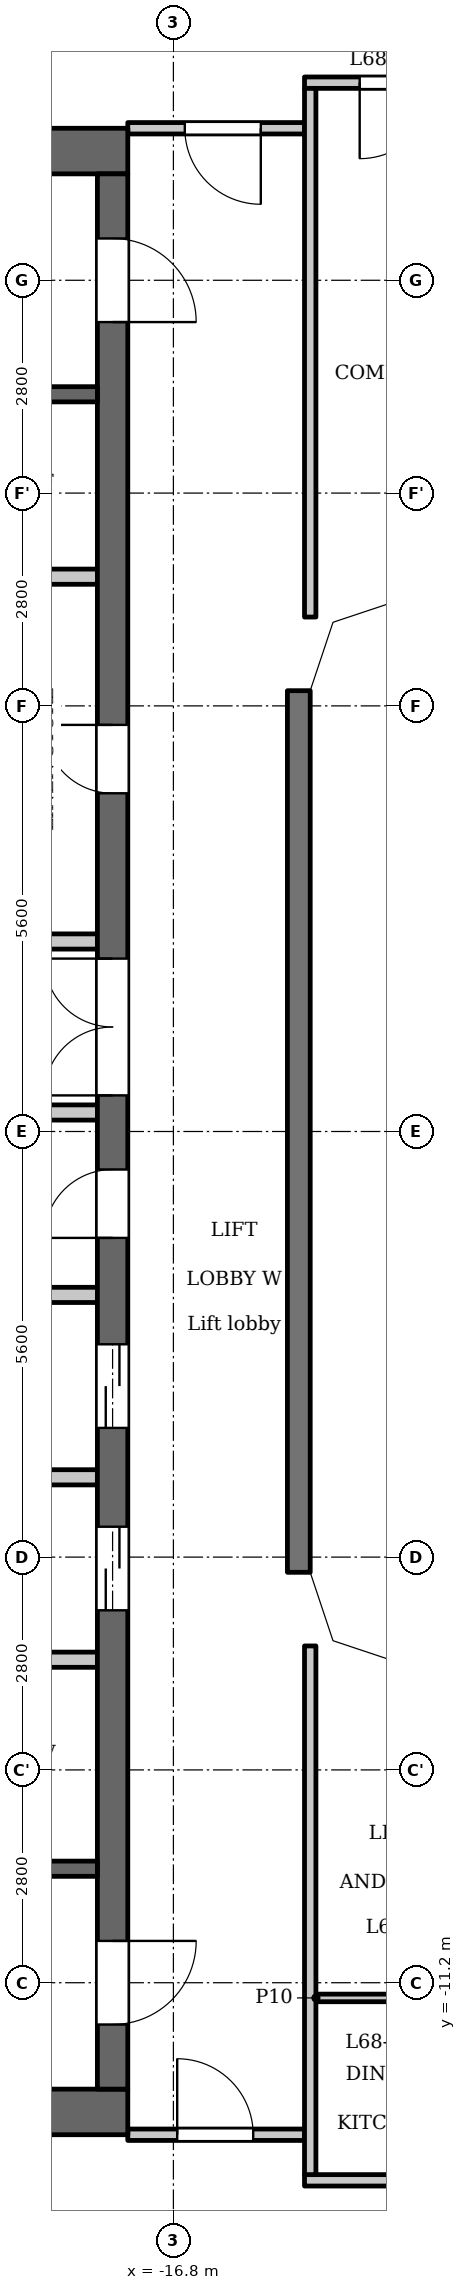
"""IFC4 building model, lengths in metres.
Left out: names, types, materials, properties, quantities, classifications, styles, units other than length and angle.
Written with IfcOpenShell. Run it as: python <this file> out.ifc"""

import sys

from ifc_helpers import new_model, si_unit, direction, frame, frame_2d, origin, place, context, subcontext, project, spatial, polyline, rectangle, outline, extrude, element, fill, save


model = new_model("IFC4")
c1 = context("Model", 3, precision=1e-05, world=origin(), true_north=direction((0.0, 1.0)))
c2 = subcontext(c1, "Body", "Model", "MODEL_VIEW")
j1 = project(units=[si_unit("LENGTHUNIT", "METRE"), si_unit("PLANEANGLEUNIT", "RADIAN")], contexts=[c1])
p1 = place(None, origin())
s1 = spatial("IfcSite", under=j1, at=p1, CompositionType="ELEMENT")
p2 = place(p1, origin())
s2 = spatial("IfcBuilding", under=s1, at=p2, CompositionType="ELEMENT")
p3 = place(p2, frame((0.0, 0.0, 262.7)))
s3 = spatial("IfcBuildingStorey", under=s2, at=p3, CompositionType="ELEMENT", Elevation=262.7)
p4 = place(p3, frame((-15.15, -5.8, 0.0), z_axis=(0.0, 0.0, 1.0), x_axis=(0.0, 1.0, 0.0)))
e1 = element("IfcWall", 1, at=p4, inside=s3, PredefinedType="SOLIDWALL", context=c2, shape_type="SweptSolid", body=[
    extrude(rectangle(XDim=11.6, YDim=0.3, at=frame_2d((5.8, 0.0))), origin(), (0.0, 0.0, 1.0), 3.2),
])
for number, where, z_axis, x_axis in (
    (2, (-17.4, 12.9, 0.0), (0.0, 0.0, 1.0), (-1.0, 0.0, 0.0)),
    (3, (-17.4, -12.9, 0.0), (0.0, 0.0, 1.0), (-1.0, 0.0, 0.0)),
):
    element("IfcWall", number, at=place(p3, frame(where, z_axis=z_axis, x_axis=x_axis)), inside=s3, PredefinedType="SHEAR", context=c2, shape_type="SweptSolid", body=[
        extrude(rectangle(XDim=7.32, YDim=0.6, at=frame_2d((3.66, 0.0))), origin(), (0.0, 0.0, 1.0), 3.2),
    ])
p5 = place(p3, frame((-17.6, -12.6, 0.0), z_axis=(0.0, 0.0, 1.0), x_axis=(0.0, 1.0, 0.0)))
e4 = element("IfcWall", 4, at=p5, inside=s3, PredefinedType="SHEAR", context=c2, shape_type="SweptSolid", body=[
    extrude(rectangle(XDim=25.2, YDim=0.4, at=frame_2d((12.6, 0.0))), origin(), (0.0, 0.0, 1.0), 3.2),
])
p6 = place(p5, frame((6.3, 0.0, 0.0)))
e5 = element("IfcOpeningElement", 5, at=p6, cuts=e4, PredefinedType="OPENING", context=c2, shape_type="SweptSolid", body=[
    extrude(rectangle(XDim=1.1, YDim=2.1, at=frame_2d((0.55, 1.05))), frame((0.0, 0.21, 0.0), z_axis=(0.0, -1.0, 0.0), x_axis=(1.0, 0.0, 0.0)), (0.0, 0.0, 1.0), 0.42),
])
p7 = place(p5, frame((8.7, 0.0, 0.0)))
e6 = element("IfcOpeningElement", 6, at=p7, cuts=e4, PredefinedType="OPENING", context=c2, shape_type="SweptSolid", body=[
    extrude(rectangle(XDim=1.1, YDim=2.1, at=frame_2d((0.55, 1.05))), frame((0.0, 0.21, 0.0), z_axis=(0.0, -1.0, 0.0), x_axis=(1.0, 0.0, 0.0)), (0.0, 0.0, 1.0), 0.42),
])
p8 = place(p5, frame((11.2, 0.0, 0.0)))
e7 = element("IfcOpeningElement", 7, at=p8, cuts=e4, PredefinedType="OPENING", context=c2, shape_type="SweptSolid", body=[
    extrude(rectangle(XDim=0.9, YDim=2.1, at=frame_2d((0.45, 1.05))), frame((0.0, 0.21, 0.0), z_axis=(0.0, -1.0, 0.0), x_axis=(1.0, 0.0, 0.0)), (0.0, 0.0, 1.0), 0.42),
])
p9 = place(p5, frame((17.05, 0.0, 0.0)))
e8 = element("IfcOpeningElement", 8, at=p9, cuts=e4, PredefinedType="OPENING", context=c2, shape_type="SweptSolid", body=[
    extrude(rectangle(XDim=0.9, YDim=2.1, at=frame_2d((0.45, 1.05))), frame((0.0, 0.21, 0.0), z_axis=(0.0, -1.0, 0.0), x_axis=(1.0, 0.0, 0.0)), (0.0, 0.0, 1.0), 0.42),
])
p10 = place(p5, frame((23.25, 0.0, 0.0)))
e9 = element("IfcOpeningElement", 9, at=p10, cuts=e4, PredefinedType="OPENING", context=c2, shape_type="SweptSolid", body=[
    extrude(rectangle(XDim=1.1, YDim=2.1, at=frame_2d((0.55, 1.05))), frame((0.0, 0.21, 0.0), z_axis=(0.0, -1.0, 0.0), x_axis=(1.0, 0.0, 0.0)), (0.0, 0.0, 1.0), 0.42),
])
p11 = place(p5, frame((0.85, 0.0, 0.0)))
e10 = element("IfcOpeningElement", 10, at=p11, cuts=e4, PredefinedType="OPENING", context=c2, shape_type="SweptSolid", body=[
    extrude(rectangle(XDim=1.1, YDim=2.1, at=frame_2d((0.55, 1.05))), frame((0.0, 0.21, 0.0), z_axis=(0.0, -1.0, 0.0), x_axis=(1.0, 0.0, 0.0)), (0.0, 0.0, 1.0), 0.42),
])
p12 = place(p5, frame((13.075, 0.0, 0.0)))
e11 = element("IfcOpeningElement", 11, at=p12, cuts=e4, PredefinedType="OPENING", context=c2, shape_type="SweptSolid", body=[
    extrude(rectangle(XDim=1.8, YDim=2.1, at=frame_2d((0.9, 1.05))), frame((0.0, 0.21, 0.0), z_axis=(0.0, -1.0, 0.0), x_axis=(1.0, 0.0, 0.0)), (0.0, 0.0, 1.0), 0.42),
])
p13 = place(p3, frame((-17.8, -9.7, 0.0), z_axis=(0.0, 0.0, 1.0), x_axis=(-1.0, 0.0, 0.0)))
e12 = element("IfcWall", 12, at=p13, inside=s3, PredefinedType="SHEAR", context=c2, shape_type="SweptSolid", body=[
    extrude(rectangle(XDim=5.8, YDim=0.2, at=frame_2d((2.9, 0.0))), origin(), (0.0, 0.0, 1.0), 3.2),
])
p14 = place(p13, frame((0.85, 0.0, 0.0)))
e13 = element("IfcOpeningElement", 13, at=p14, cuts=e12, PredefinedType="OPENING", context=c2, shape_type="SweptSolid", body=[
    extrude(rectangle(XDim=1.1, YDim=2.1, at=frame_2d((0.55, 1.05))), frame((0.0, 0.11, 0.0), z_axis=(0.0, -1.0, 0.0), x_axis=(1.0, 0.0, 0.0)), (0.0, 0.0, 1.0), 0.22),
])
p15 = place(p13, frame((3.75, 0.0, 0.0)))
e14 = element("IfcOpeningElement", 14, at=p15, cuts=e12, PredefinedType="OPENING", context=c2, shape_type="SweptSolid", body=[
    extrude(rectangle(XDim=1.1, YDim=2.1, at=frame_2d((0.55, 1.05))), frame((0.0, 0.11, 0.0), z_axis=(0.0, -1.0, 0.0), x_axis=(1.0, 0.0, 0.0)), (0.0, 0.0, 1.0), 0.22),
])
for number, where, z_axis, x_axis in (
    (15, (-17.8, -6.95, 0.0), (0.0, 0.0, 1.0), (-1.0, 0.0, 0.0)),
    (16, (-17.8, -4.55, 0.0), (0.0, 0.0, 1.0), (-1.0, 0.0, 0.0)),
    (17, (-17.8, -2.15, 0.0), (0.0, 0.0, 1.0), (-1.0, 0.0, 0.0)),
):
    element("IfcWall", number, at=place(p3, frame(where, z_axis=z_axis, x_axis=x_axis)), inside=s3, PredefinedType="PARTITIONING", context=c2, shape_type="SweptSolid", body=[
        extrude(rectangle(XDim=2.8, YDim=0.2, at=frame_2d((1.4, 0.0))), origin(), (0.0, 0.0, 1.0), 3.2),
    ])
p16 = place(p3, frame((-17.8, 0.25, 0.0), z_axis=(0.0, 0.0, 1.0), x_axis=(-1.0, 0.0, 0.0)))
e18 = element("IfcWall", 18, at=p16, inside=s3, PredefinedType="PARTITIONING", context=c2, shape_type="SweptSolid", body=[
    extrude(rectangle(XDim=3.0, YDim=0.2, at=frame_2d((1.5, 0.0))), origin(), (0.0, 0.0, 1.0), 3.2),
])
p17 = place(p3, frame((-17.8, 2.5, 0.0), z_axis=(0.0, 0.0, 1.0), x_axis=(-1.0, 0.0, 0.0)))
e19 = element("IfcWall", 19, at=p17, inside=s3, PredefinedType="PARTITIONING", context=c2, shape_type="SweptSolid", body=[
    extrude(rectangle(XDim=3.0, YDim=0.2, at=frame_2d((1.5, 0.0))), origin(), (0.0, 0.0, 1.0), 3.2),
])
p18 = place(p17, frame((1.7, 0.0, 0.0)))
e20 = element("IfcOpeningElement", 20, at=p18, cuts=e19, PredefinedType="OPENING", context=c2, shape_type="SweptSolid", body=[
    extrude(rectangle(XDim=0.9, YDim=2.1, at=frame_2d((0.45, 1.05))), frame((0.0, 0.11, 0.0), z_axis=(0.0, -1.0, 0.0), x_axis=(1.0, 0.0, 0.0)), (0.0, 0.0, 1.0), 0.22),
])
p19 = place(p3, frame((-17.8, 7.3, 0.0), z_axis=(0.0, 0.0, 1.0), x_axis=(-1.0, 0.0, 0.0)))
e21 = element("IfcWall", 21, at=p19, inside=s3, PredefinedType="PARTITIONING", context=c2, shape_type="SweptSolid", body=[
    extrude(rectangle(XDim=2.8, YDim=0.2, at=frame_2d((1.4, 0.0))), origin(), (0.0, 0.0, 1.0), 3.2),
])
p20 = place(p3, frame((-17.8, 9.7, 0.0), z_axis=(0.0, 0.0, 1.0), x_axis=(-1.0, 0.0, 0.0)))
e22 = element("IfcWall", 22, at=p20, inside=s3, PredefinedType="SHEAR", context=c2, shape_type="SweptSolid", body=[
    extrude(rectangle(XDim=5.8, YDim=0.2, at=frame_2d((2.9, 0.0))), origin(), (0.0, 0.0, 1.0), 3.2),
])
p21 = place(p20, frame((0.85, 0.0, 0.0)))
e23 = element("IfcOpeningElement", 23, at=p21, cuts=e22, PredefinedType="OPENING", context=c2, shape_type="SweptSolid", body=[
    extrude(rectangle(XDim=1.1, YDim=2.1, at=frame_2d((0.55, 1.05))), frame((0.0, 0.11, 0.0), z_axis=(0.0, -1.0, 0.0), x_axis=(1.0, 0.0, 0.0)), (0.0, 0.0, 1.0), 0.22),
])
p22 = place(p20, frame((3.75, 0.0, 0.0)))
e24 = element("IfcOpeningElement", 24, at=p22, cuts=e22, PredefinedType="OPENING", context=c2, shape_type="SweptSolid", body=[
    extrude(rectangle(XDim=1.1, YDim=2.1, at=frame_2d((0.55, 1.05))), frame((0.0, 0.11, 0.0), z_axis=(0.0, -1.0, 0.0), x_axis=(1.0, 0.0, 0.0)), (0.0, 0.0, 1.0), 0.22),
])
p23 = place(p3, frame((-15.075, -13.8, 0.0), z_axis=(0.0, 0.0, 1.0), x_axis=(1.0, 0.0, 0.0)))
e25 = element("IfcWall", 25, at=p23, inside=s3, PredefinedType="PARTITIONING", context=c2, shape_type="SweptSolid", body=[
    extrude(rectangle(XDim=30.15, YDim=0.15, at=frame_2d((15.075, 0.0))), origin(), (0.0, 0.0, 1.0), 3.2),
])
p24 = place(p23, frame((2.225, 0.0, 0.0)))
e26 = element("IfcOpeningElement", 26, at=p24, cuts=e25, PredefinedType="OPENING", context=c2, shape_type="SweptSolid", body=[
    extrude(rectangle(XDim=1.0, YDim=2.1, at=frame_2d((0.5, 1.05))), frame((0.0, 0.085, 0.0), z_axis=(0.0, -1.0, 0.0), x_axis=(1.0, 0.0, 0.0)), (0.0, 0.0, 1.0), 0.17),
])
p25 = place(p23, frame((10.825, 0.0, 0.0)))
e27 = element("IfcOpeningElement", 27, at=p25, cuts=e25, PredefinedType="OPENING", context=c2, shape_type="SweptSolid", body=[
    extrude(rectangle(XDim=1.0, YDim=2.1, at=frame_2d((0.5, 1.05))), frame((0.0, 0.085, 0.0), z_axis=(0.0, -1.0, 0.0), x_axis=(1.0, 0.0, 0.0)), (0.0, 0.0, 1.0), 0.17),
])
p26 = place(p23, frame((15.775, 0.0, 0.0)))
e28 = element("IfcOpeningElement", 28, at=p26, cuts=e25, PredefinedType="OPENING", context=c2, shape_type="SweptSolid", body=[
    extrude(rectangle(XDim=1.0, YDim=2.1, at=frame_2d((0.5, 1.05))), frame((0.0, 0.085, 0.0), z_axis=(0.0, -1.0, 0.0), x_axis=(1.0, 0.0, 0.0)), (0.0, 0.0, 1.0), 0.17),
])
p27 = place(p3, frame((-17.4, -13.2, 0.0), z_axis=(0.0, 0.0, 1.0), x_axis=(1.0, 0.0, 0.0)))
e29 = element("IfcWall", 29, at=p27, inside=s3, PredefinedType="PARTITIONING", context=c2, shape_type="SweptSolid", body=[
    extrude(rectangle(XDim=2.325, YDim=0.15, at=frame_2d((1.163, 0.0))), origin(), (0.0, 0.0, 1.0), 3.2),
])
p28 = place(p27, frame((0.65, 0.0, 0.0)))
e30 = element("IfcOpeningElement", 30, at=p28, cuts=e29, PredefinedType="OPENING", context=c2, shape_type="SweptSolid", body=[
    extrude(rectangle(XDim=1.0, YDim=2.1, at=frame_2d((0.5, 1.05))), frame((0.0, 0.085, 0.0), z_axis=(0.0, -1.0, 0.0), x_axis=(1.0, 0.0, 0.0)), (0.0, 0.0, 1.0), 0.17),
])
p29 = place(p3, frame((-14.925, -11.4, 0.0), z_axis=(0.0, 0.0, 1.0), x_axis=(1.0, 0.0, 0.0)))
e31 = element("IfcWall", 31, at=p29, inside=s3, PredefinedType="PARTITIONING", context=c2, shape_type="SweptSolid", body=[
    extrude(rectangle(XDim=29.85, YDim=0.1, at=frame_2d((14.925, 0.0))), origin(), (0.0, 0.0, 1.0), 3.2),
])
p30 = place(p29, frame((7.875, 0.0, 0.0)))
e32 = element("IfcOpeningElement", 32, at=p30, cuts=e31, PredefinedType="OPENING", context=c2, shape_type="SweptSolid", body=[
    extrude(rectangle(XDim=0.8, YDim=2.1, at=frame_2d((0.4, 1.05))), frame((0.0, 0.06, 0.0), z_axis=(0.0, -1.0, 0.0), x_axis=(1.0, 0.0, 0.0)), (0.0, 0.0, 1.0), 0.12),
])
p31 = place(p29, frame((1.175, 0.0, 0.0)))
e33 = element("IfcOpeningElement", 33, at=p31, cuts=e31, PredefinedType="OPENING", context=c2, shape_type="SweptSolid", body=[
    extrude(rectangle(XDim=0.9, YDim=2.1, at=frame_2d((0.45, 1.05))), frame((0.0, 0.06, 0.0), z_axis=(0.0, -1.0, 0.0), x_axis=(1.0, 0.0, 0.0)), (0.0, 0.0, 1.0), 0.12),
])
p32 = place(p29, frame((13.475, 0.0, 0.0)))
e34 = element("IfcOpeningElement", 34, at=p32, cuts=e31, PredefinedType="OPENING", context=c2, shape_type="SweptSolid", body=[
    extrude(rectangle(XDim=0.8, YDim=2.1, at=frame_2d((0.4, 1.05))), frame((0.0, 0.06, 0.0), z_axis=(0.0, -1.0, 0.0), x_axis=(1.0, 0.0, 0.0)), (0.0, 0.0, 1.0), 0.12),
])
p33 = place(p29, frame((9.775, 0.0, 0.0)))
e35 = element("IfcOpeningElement", 35, at=p33, cuts=e31, PredefinedType="OPENING", context=c2, shape_type="SweptSolid", body=[
    extrude(rectangle(XDim=0.9, YDim=2.1, at=frame_2d((0.45, 1.05))), frame((0.0, 0.06, 0.0), z_axis=(0.0, -1.0, 0.0), x_axis=(1.0, 0.0, 0.0)), (0.0, 0.0, 1.0), 0.12),
])
p34 = place(p29, frame((16.675, 0.0, 0.0)))
e36 = element("IfcOpeningElement", 36, at=p34, cuts=e31, PredefinedType="OPENING", context=c2, shape_type="SweptSolid", body=[
    extrude(rectangle(XDim=0.9, YDim=2.1, at=frame_2d((0.45, 1.05))), frame((0.0, 0.06, 0.0), z_axis=(0.0, -1.0, 0.0), x_axis=(1.0, 0.0, 0.0)), (0.0, 0.0, 1.0), 0.12),
])
p35 = place(p29, frame((18.225, 0.0, 0.0)))
e37 = element("IfcOpeningElement", 37, at=p35, cuts=e31, PredefinedType="OPENING", context=c2, shape_type="SweptSolid", body=[
    extrude(rectangle(XDim=0.9, YDim=2.1, at=frame_2d((0.45, 1.05))), frame((0.0, 0.06, 0.0), z_axis=(0.0, -1.0, 0.0), x_axis=(1.0, 0.0, 0.0)), (0.0, 0.0, 1.0), 0.12),
])
p36 = place(p29, frame((24.325, 0.0, 0.0)))
e38 = element("IfcOpeningElement", 38, at=p36, cuts=e31, PredefinedType="OPENING", context=c2, shape_type="SweptSolid", body=[
    extrude(rectangle(XDim=0.9, YDim=2.1, at=frame_2d((0.45, 1.05))), frame((0.0, 0.06, 0.0), z_axis=(0.0, -1.0, 0.0), x_axis=(1.0, 0.0, 0.0)), (0.0, 0.0, 1.0), 0.12),
])
p37 = place(p3, frame((-17.4, 13.2, 0.0), z_axis=(0.0, 0.0, 1.0), x_axis=(1.0, 0.0, 0.0)))
e39 = element("IfcWall", 39, at=p37, inside=s3, PredefinedType="PARTITIONING", context=c2, shape_type="SweptSolid", body=[
    extrude(rectangle(XDim=2.325, YDim=0.15, at=frame_2d((1.163, 0.0))), origin(), (0.0, 0.0, 1.0), 3.2),
])
p38 = place(p37, frame((0.75, 0.0, 0.0)))
e40 = element("IfcOpeningElement", 40, at=p38, cuts=e39, PredefinedType="OPENING", context=c2, shape_type="SweptSolid", body=[
    extrude(rectangle(XDim=1.0, YDim=2.1, at=frame_2d((0.5, 1.05))), frame((0.0, 0.085, 0.0), z_axis=(0.0, -1.0, 0.0), x_axis=(1.0, 0.0, 0.0)), (0.0, 0.0, 1.0), 0.17),
])
p39 = place(p3, frame((-15.075, 13.8, 0.0), z_axis=(0.0, 0.0, 1.0), x_axis=(1.0, 0.0, 0.0)))
e41 = element("IfcWall", 41, at=p39, inside=s3, PredefinedType="PARTITIONING", context=c2, shape_type="SweptSolid", body=[
    extrude(rectangle(XDim=30.15, YDim=0.15, at=frame_2d((15.075, 0.0))), origin(), (0.0, 0.0, 1.0), 3.2),
])
p40 = place(p39, frame((0.726, 0.0, 0.0)))
e42 = element("IfcOpeningElement", 42, at=p40, cuts=e41, PredefinedType="OPENING", context=c2, shape_type="SweptSolid", body=[
    extrude(rectangle(XDim=1.0, YDim=2.1, at=frame_2d((0.5, 1.05))), frame((0.0, 0.085, 0.0), z_axis=(0.0, -1.0, 0.0), x_axis=(1.0, 0.0, 0.0)), (0.0, 0.0, 1.0), 0.17),
])
p41 = place(p39, frame((7.775, 0.0, 0.0)))
e43 = element("IfcOpeningElement", 43, at=p41, cuts=e41, PredefinedType="OPENING", context=c2, shape_type="SweptSolid", body=[
    extrude(rectangle(XDim=1.0, YDim=2.1, at=frame_2d((0.5, 1.05))), frame((0.0, 0.085, 0.0), z_axis=(0.0, -1.0, 0.0), x_axis=(1.0, 0.0, 0.0)), (0.0, 0.0, 1.0), 0.17),
])
p42 = place(p39, frame((10.125, 0.0, 0.0)))
e44 = element("IfcOpeningElement", 44, at=p42, cuts=e41, PredefinedType="OPENING", context=c2, shape_type="SweptSolid", body=[
    extrude(rectangle(XDim=1.0, YDim=2.1, at=frame_2d((0.5, 1.05))), frame((0.0, 0.085, 0.0), z_axis=(0.0, -1.0, 0.0), x_axis=(1.0, 0.0, 0.0)), (0.0, 0.0, 1.0), 0.17),
])
p43 = place(p39, frame((18.975, 0.0, 0.0)))
e45 = element("IfcOpeningElement", 45, at=p43, cuts=e41, PredefinedType="OPENING", context=c2, shape_type="SweptSolid", body=[
    extrude(rectangle(XDim=1.0, YDim=2.1, at=frame_2d((0.5, 1.05))), frame((0.0, 0.085, 0.0), z_axis=(0.0, -1.0, 0.0), x_axis=(1.0, 0.0, 0.0)), (0.0, 0.0, 1.0), 0.17),
])
p44 = place(p39, frame((21.325, 0.0, 0.0)))
e46 = element("IfcOpeningElement", 46, at=p44, cuts=e41, PredefinedType="OPENING", context=c2, shape_type="SweptSolid", body=[
    extrude(rectangle(XDim=1.0, YDim=2.1, at=frame_2d((0.5, 1.05))), frame((0.0, 0.085, 0.0), z_axis=(0.0, -1.0, 0.0), x_axis=(1.0, 0.0, 0.0)), (0.0, 0.0, 1.0), 0.17),
])
p45 = place(p39, frame((28.425, 0.0, 0.0)))
e47 = element("IfcOpeningElement", 47, at=p45, cuts=e41, PredefinedType="OPENING", context=c2, shape_type="SweptSolid", body=[
    extrude(rectangle(XDim=1.0, YDim=2.1, at=frame_2d((0.5, 1.05))), frame((0.0, 0.085, 0.0), z_axis=(0.0, -1.0, 0.0), x_axis=(1.0, 0.0, 0.0)), (0.0, 0.0, 1.0), 0.17),
])
for number, where, z_axis, x_axis in (
    (48, (-15.0, -13.725, 0.0), (0.0, 0.0, 1.0), (0.0, 1.0, 0.0)),
    (49, (-15.0, 6.769, 0.0), (0.0, 0.0, 1.0), (0.0, 1.0, 0.0)),
):
    element("IfcWall", number, at=place(p3, frame(where, z_axis=z_axis, x_axis=x_axis)), inside=s3, PredefinedType="PARTITIONING", context=c2, shape_type="SweptSolid", body=[
        extrude(rectangle(XDim=6.956, YDim=0.15, at=frame_2d((3.478, 0.0))), origin(), (0.0, 0.0, 1.0), 3.2),
    ])
p46 = place(p3, origin())
e50 = element("IfcWall", 50, at=p46, inside=s3, PredefinedType="SOLIDWALL", context=c2, shape_type="SweptSolid", body=[
    extrude(outline(polyline([(-13.849, 7.3), (-14.937, 6.937), (-15.3, 5.849), (-15.3, 5.8), (-15.0, 5.8), (-14.7, 6.7), (-13.8, 7.0), (-13.8, 7.3), (-13.849, 7.3)])), origin(), (0.0, 0.0, 1.0), 3.2),
])
e51 = element("IfcWall", 51, at=p46, inside=s3, PredefinedType="SOLIDWALL", context=c2, shape_type="SweptSolid", body=[
    extrude(outline(polyline([(-14.937, -6.937), (-13.849, -7.3), (-13.8, -7.3), (-13.8, -7.0), (-14.7, -6.7), (-15.0, -5.8), (-15.3, -5.8), (-15.3, -5.849), (-14.937, -6.937)])), origin(), (0.0, 0.0, 1.0), 3.2),
])
p47 = place(p6, origin())
e52 = element("IfcDoor", 52, at=p47, inside=s3, OperationType="DOUBLE_DOOR_SLIDING", PredefinedType="DOOR", context=c2, shape_type="SweptSolid", body=[
    extrude(rectangle(XDim=1.1, YDim=2.1, at=frame_2d((0.55, 1.05))), frame((0.0, 0.025, 0.0), z_axis=(0.0, -1.0, 0.0), x_axis=(1.0, 0.0, 0.0)), (0.0, 0.0, 1.0), 0.05),
])
fill(e5, e52)
p48 = place(p7, origin())
e53 = element("IfcDoor", 53, at=p48, inside=s3, OperationType="DOUBLE_DOOR_SLIDING", PredefinedType="DOOR", context=c2, shape_type="SweptSolid", body=[
    extrude(rectangle(XDim=1.1, YDim=2.1, at=frame_2d((0.55, 1.05))), frame((0.0, 0.025, 0.0), z_axis=(0.0, -1.0, 0.0), x_axis=(1.0, 0.0, 0.0)), (0.0, 0.0, 1.0), 0.05),
])
fill(e6, e53)
p49 = place(p8, origin())
e54 = element("IfcDoor", 54, at=p49, inside=s3, OperationType="SINGLE_SWING_RIGHT", PredefinedType="DOOR", context=c2, shape_type="SweptSolid", body=[
    extrude(rectangle(XDim=0.9, YDim=2.1, at=frame_2d((0.45, 1.05))), frame((0.0, 0.025, 0.0), z_axis=(0.0, -1.0, 0.0), x_axis=(1.0, 0.0, 0.0)), (0.0, 0.0, 1.0), 0.05),
])
fill(e7, e54)
p50 = place(p9, origin())
e55 = element("IfcDoor", 55, at=p50, inside=s3, OperationType="SINGLE_SWING_LEFT", PredefinedType="DOOR", context=c2, shape_type="SweptSolid", body=[
    extrude(rectangle(XDim=0.9, YDim=2.1, at=frame_2d((0.45, 1.05))), frame((0.0, 0.025, 0.0), z_axis=(0.0, -1.0, 0.0), x_axis=(1.0, 0.0, 0.0)), (0.0, 0.0, 1.0), 0.05),
])
fill(e8, e55)
p51 = place(p10, origin())
e56 = element("IfcDoor", 56, at=p51, inside=s3, OperationType="SINGLE_SWING_LEFT", PredefinedType="DOOR", context=c2, shape_type="SweptSolid", body=[
    extrude(rectangle(XDim=1.1, YDim=2.1, at=frame_2d((0.55, 1.05))), frame((0.0, 0.025, 0.0), z_axis=(0.0, -1.0, 0.0), x_axis=(1.0, 0.0, 0.0)), (0.0, 0.0, 1.0), 0.05),
])
fill(e9, e56)
p52 = place(p11, origin())
e57 = element("IfcDoor", 57, at=p52, inside=s3, OperationType="SINGLE_SWING_RIGHT", PredefinedType="DOOR", context=c2, shape_type="SweptSolid", body=[
    extrude(rectangle(XDim=1.1, YDim=2.1, at=frame_2d((0.55, 1.05))), frame((0.0, 0.025, 0.0), z_axis=(0.0, -1.0, 0.0), x_axis=(1.0, 0.0, 0.0)), (0.0, 0.0, 1.0), 0.05),
])
fill(e10, e57)
p53 = place(p12, origin())
e58 = element("IfcDoor", 58, at=p53, inside=s3, OperationType="DOUBLE_DOOR_SINGLE_SWING", PredefinedType="DOOR", context=c2, shape_type="SweptSolid", body=[
    extrude(rectangle(XDim=1.8, YDim=2.1, at=frame_2d((0.9, 1.05))), frame((0.0, 0.025, 0.0), z_axis=(0.0, -1.0, 0.0), x_axis=(1.0, 0.0, 0.0)), (0.0, 0.0, 1.0), 0.05),
])
fill(e11, e58)
p54 = place(p38, origin())
e59 = element("IfcDoor", 59, at=p54, inside=s3, OperationType="SINGLE_SWING_RIGHT", PredefinedType="DOOR", context=c2, shape_type="SweptSolid", body=[
    extrude(rectangle(XDim=1.0, YDim=2.1, at=frame_2d((0.5, 1.05))), frame((0.0, 0.025, 0.0), z_axis=(0.0, -1.0, 0.0), x_axis=(1.0, 0.0, 0.0)), (0.0, 0.0, 1.0), 0.05),
])
fill(e40, e59)
p55 = place(p28, origin())
e60 = element("IfcDoor", 60, at=p55, inside=s3, OperationType="SINGLE_SWING_RIGHT", PredefinedType="DOOR", context=c2, shape_type="SweptSolid", body=[
    extrude(rectangle(XDim=1.0, YDim=2.1, at=frame_2d((0.5, 1.05))), frame((0.0, 0.025, 0.0), z_axis=(0.0, -1.0, 0.0), x_axis=(1.0, 0.0, 0.0)), (0.0, 0.0, 1.0), 0.05),
])
fill(e30, e60)
p56 = place(p40, origin())
e61 = element("IfcDoor", 61, at=p56, inside=s3, OperationType="SINGLE_SWING_LEFT", PredefinedType="DOOR", context=c2, shape_type="SweptSolid", body=[
    extrude(rectangle(XDim=1.0, YDim=2.1, at=frame_2d((0.5, 1.05))), frame((0.0, 0.025, 0.0), z_axis=(0.0, -1.0, 0.0), x_axis=(1.0, 0.0, 0.0)), (0.0, 0.0, 1.0), 0.05),
])
fill(e42, e61)
save(model, sys.argv[1])
